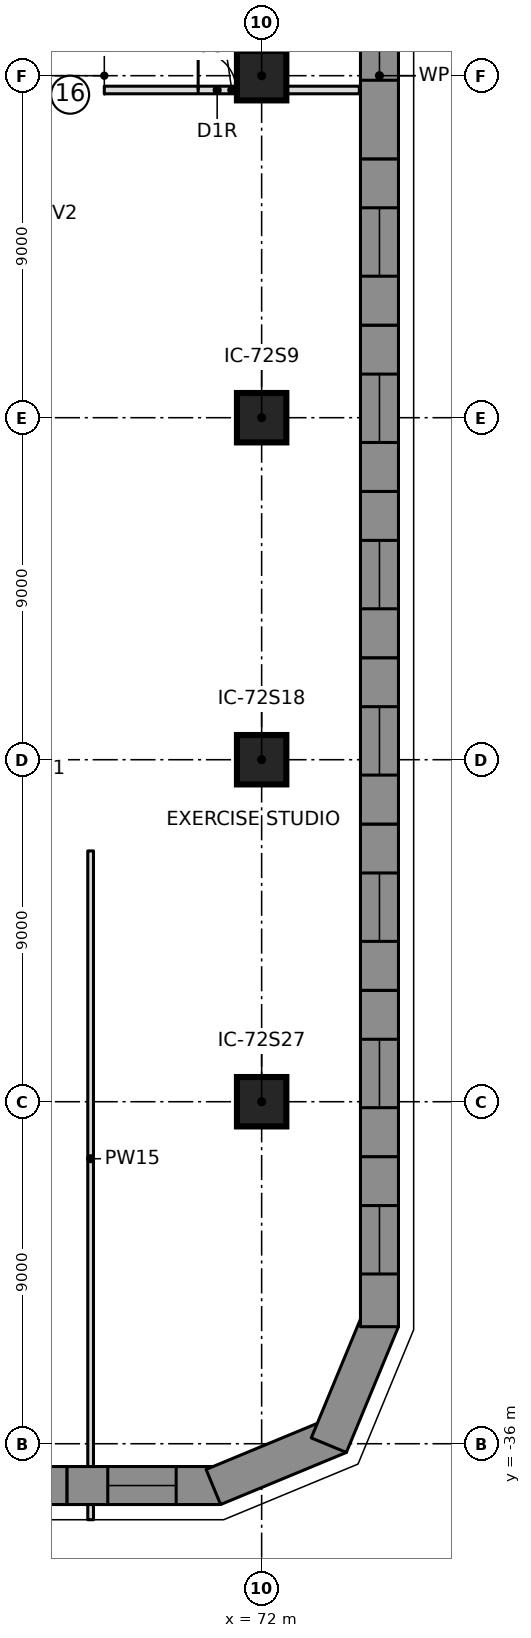
"""IFC4 building model, lengths in metres.
Left out: names, types, materials, properties, quantities, classifications, styles, units other than length and angle.
Written with IfcOpenShell. Run it as: python <this file> out.ifc"""

import sys

from ifc_helpers import new_model, si_unit, direction, frame, frame_2d, origin, origin_2d, place, context, subcontext, project, spatial, polyline, rectangle, outline, extrude, element, fill, save


model = new_model("IFC4")
c1 = context("Model", 3, precision=1e-05, world=origin(), true_north=direction((0.0, 1.0)))
c2 = subcontext(c1, "Body", "Model", "MODEL_VIEW")
j1 = project(units=[si_unit("LENGTHUNIT", "METRE"), si_unit("PLANEANGLEUNIT", "RADIAN")], contexts=[c1])
p1 = place(None, origin())
s1 = spatial("IfcSite", under=j1, at=p1, CompositionType="ELEMENT")
p2 = place(p1, origin())
s2 = spatial("IfcBuilding", under=s1, at=p2, CompositionType="ELEMENT")
p3 = place(p2, frame((0.0, 0.0, 19.0)))
s3 = spatial("IfcBuildingStorey", under=s2, at=p3, CompositionType="ELEMENT", Elevation=19.0)
for number, where, z_axis, x_axis in (
    (1, (72.0, -27.0, 0.0), (0.0, 0.0, 1.0), (1.0, 0.0, 0.0)),
    (2, (72.0, -18.0, 0.0), (0.0, 0.0, 1.0), (1.0, 0.0, 0.0)),
    (3, (72.0, -9.0, 0.0), (0.0, 0.0, 1.0), (1.0, 0.0, 0.0)),
    (4, (72.0, 0.0, 0.0), (0.0, 0.0, 1.0), (1.0, 0.0, 0.0)),
):
    element("IfcColumn", number, at=place(p3, frame(where, z_axis=z_axis, x_axis=x_axis)), inside=s3, PredefinedType="COLUMN", context=c2, shape_type="SweptSolid", body=[
        extrude(rectangle(XDim=1.3, YDim=1.3, at=origin_2d()), origin(), (0.0, 0.0, 1.0), 5.0),
    ])
p4 = place(p3, frame((62.94, -37.1, 0.0), z_axis=(0.0, 0.0, 1.0), x_axis=(1.0, 0.0, 0.0)))
e5 = element("IfcWall", 5, at=p4, inside=s3, PredefinedType="NOTDEFINED", context=c2, shape_type="SweptSolid", body=[
    extrude(outline(polyline([(0.0, -0.5), (3.94, -0.5), (3.94, 0.5), (0.0, 0.5), (0.0, -0.5)])), origin(), (0.0, 0.0, 1.0), 4.7),
])
p5 = place(p4, frame((1.07, 0.0, 0.9)))
e6 = element("IfcOpeningElement", 6, at=p5, cuts=e5, PredefinedType="OPENING", context=c2, shape_type="SweptSolid", body=[
    extrude(rectangle(XDim=1.8, YDim=2.4, at=frame_2d((0.9, 1.2))), frame((0.0, 0.51, 0.0), z_axis=(0.0, -1.0, 0.0), x_axis=(1.0, 0.0, 0.0)), (0.0, 0.0, 1.0), 1.02),
])
p6 = place(p3, frame((66.881, -37.1, 0.0), z_axis=(0.0, 0.0, 1.0), x_axis=(1.0, 0.0, 0.0)))
e7 = element("IfcWall", 7, at=p6, inside=s3, PredefinedType="NOTDEFINED", context=c2, shape_type="SweptSolid", body=[
    extrude(outline(polyline([(0.0, -0.5), (4.04, -0.5), (3.841, 0.5), (0.0, 0.5), (0.0, -0.5)])), origin(), (0.0, 0.0, 1.0), 4.7),
])
p7 = place(p6, frame((1.07, 0.0, 0.9)))
e8 = element("IfcOpeningElement", 8, at=p7, cuts=e7, PredefinedType="OPENING", context=c2, shape_type="SweptSolid", body=[
    extrude(rectangle(XDim=1.8, YDim=2.4, at=frame_2d((0.9, 1.2))), frame((0.0, 0.51, 0.0), z_axis=(0.0, -1.0, 0.0), x_axis=(1.0, 0.0, 0.0)), (0.0, 0.0, 1.0), 1.02),
])
p8 = place(p3, frame((70.821, -37.1, 0.0), z_axis=(0.0, 0.0, 1.0), x_axis=(0.923862365102, 0.382724875529, 0.0)))
e9 = element("IfcWall", 9, at=p8, inside=s3, PredefinedType="NOTDEFINED", context=c2, shape_type="SweptSolid", body=[
    extrude(outline(polyline([(-0.1, -0.5), (3.482, -0.5), (3.068, 0.5), (0.1, 0.5), (-0.1, -0.5)])), origin(), (0.0, 0.0, 1.0), 4.7),
])
p9 = place(p3, frame((73.847, -35.847, 0.0), z_axis=(0.0, 0.0, 1.0), x_axis=(0.382724875529, 0.923862365102, 0.0)))
e10 = element("IfcWall", 10, at=p9, inside=s3, PredefinedType="NOTDEFINED", context=c2, shape_type="SweptSolid", body=[
    extrude(outline(polyline([(-0.207, -0.5), (3.375, -0.5), (3.175, 0.5), (0.207, 0.5), (-0.207, -0.5)])), origin(), (0.0, 0.0, 1.0), 4.7),
])
p10 = place(p3, frame((75.1, -32.821, 0.0), z_axis=(0.0, 0.0, 1.0), x_axis=(0.0, 1.0, 0.0)))
e11 = element("IfcWall", 11, at=p10, inside=s3, PredefinedType="NOTDEFINED", context=c2, shape_type="SweptSolid", body=[
    extrude(outline(polyline([(-0.1, -0.5), (4.376, -0.5), (4.376, 0.5), (0.1, 0.5), (-0.1, -0.5)])), origin(), (0.0, 0.0, 1.0), 4.7),
])
p11 = place(p10, frame((1.288, 0.0, 0.9)))
e12 = element("IfcOpeningElement", 12, at=p11, cuts=e11, PredefinedType="OPENING", context=c2, shape_type="SweptSolid", body=[
    extrude(rectangle(XDim=1.8, YDim=2.4, at=frame_2d((0.9, 1.2))), frame((0.0, 0.51, 0.0), z_axis=(0.0, -1.0, 0.0), x_axis=(1.0, 0.0, 0.0)), (0.0, 0.0, 1.0), 1.02),
])
p12 = place(p3, frame((75.1, -28.445, 0.0), z_axis=(0.0, 0.0, 1.0), x_axis=(0.0, 1.0, 0.0)))
e13 = element("IfcWall", 13, at=p12, inside=s3, PredefinedType="NOTDEFINED", context=c2, shape_type="SweptSolid", body=[
    extrude(outline(polyline([(0.0, -0.5), (4.376, -0.5), (4.376, 0.5), (0.0, 0.5), (0.0, -0.5)])), origin(), (0.0, 0.0, 1.0), 4.7),
])
p13 = place(p12, frame((1.288, 0.0, 0.9)))
e14 = element("IfcOpeningElement", 14, at=p13, cuts=e13, PredefinedType="OPENING", context=c2, shape_type="SweptSolid", body=[
    extrude(rectangle(XDim=1.8, YDim=2.4, at=frame_2d((0.9, 1.2))), frame((0.0, 0.51, 0.0), z_axis=(0.0, -1.0, 0.0), x_axis=(1.0, 0.0, 0.0)), (0.0, 0.0, 1.0), 1.02),
])
p14 = place(p3, frame((75.1, -24.069, 0.0), z_axis=(0.0, 0.0, 1.0), x_axis=(0.0, 1.0, 0.0)))
e15 = element("IfcWall", 15, at=p14, inside=s3, PredefinedType="NOTDEFINED", context=c2, shape_type="SweptSolid", body=[
    extrude(outline(polyline([(0.0, -0.5), (4.376, -0.5), (4.376, 0.5), (0.0, 0.5), (0.0, -0.5)])), origin(), (0.0, 0.0, 1.0), 4.7),
])
p15 = place(p14, frame((1.288, 0.0, 0.9)))
e16 = element("IfcOpeningElement", 16, at=p15, cuts=e15, PredefinedType="OPENING", context=c2, shape_type="SweptSolid", body=[
    extrude(rectangle(XDim=1.8, YDim=2.4, at=frame_2d((0.9, 1.2))), frame((0.0, 0.51, 0.0), z_axis=(0.0, -1.0, 0.0), x_axis=(1.0, 0.0, 0.0)), (0.0, 0.0, 1.0), 1.02),
])
p16 = place(p3, frame((75.1, -19.693, 0.0), z_axis=(0.0, 0.0, 1.0), x_axis=(0.0, 1.0, 0.0)))
e17 = element("IfcWall", 17, at=p16, inside=s3, PredefinedType="NOTDEFINED", context=c2, shape_type="SweptSolid", body=[
    extrude(outline(polyline([(0.0, -0.5), (4.376, -0.5), (4.376, 0.5), (0.0, 0.5), (0.0, -0.5)])), origin(), (0.0, 0.0, 1.0), 4.7),
])
p17 = place(p16, frame((1.288, 0.0, 0.9)))
e18 = element("IfcOpeningElement", 18, at=p17, cuts=e17, PredefinedType="OPENING", context=c2, shape_type="SweptSolid", body=[
    extrude(rectangle(XDim=1.8, YDim=2.4, at=frame_2d((0.9, 1.2))), frame((0.0, 0.51, 0.0), z_axis=(0.0, -1.0, 0.0), x_axis=(1.0, 0.0, 0.0)), (0.0, 0.0, 1.0), 1.02),
])
p18 = place(p3, frame((75.1, -15.316, 0.0), z_axis=(0.0, 0.0, 1.0), x_axis=(0.0, 1.0, 0.0)))
e19 = element("IfcWall", 19, at=p18, inside=s3, PredefinedType="NOTDEFINED", context=c2, shape_type="SweptSolid", body=[
    extrude(outline(polyline([(0.0, -0.5), (4.376, -0.5), (4.376, 0.5), (0.0, 0.5), (0.0, -0.5)])), origin(), (0.0, 0.0, 1.0), 4.7),
])
p19 = place(p18, frame((1.288, 0.0, 0.9)))
e20 = element("IfcOpeningElement", 20, at=p19, cuts=e19, PredefinedType="OPENING", context=c2, shape_type="SweptSolid", body=[
    extrude(rectangle(XDim=1.8, YDim=2.4, at=frame_2d((0.9, 1.2))), frame((0.0, 0.51, 0.0), z_axis=(0.0, -1.0, 0.0), x_axis=(1.0, 0.0, 0.0)), (0.0, 0.0, 1.0), 1.02),
])
p20 = place(p3, frame((75.1, -10.94, 0.0), z_axis=(0.0, 0.0, 1.0), x_axis=(0.0, 1.0, 0.0)))
e21 = element("IfcWall", 21, at=p20, inside=s3, PredefinedType="NOTDEFINED", context=c2, shape_type="SweptSolid", body=[
    extrude(outline(polyline([(0.0, -0.5), (4.376, -0.5), (4.376, 0.5), (0.0, 0.5), (0.0, -0.5)])), origin(), (0.0, 0.0, 1.0), 4.7),
])
p21 = place(p20, frame((1.288, 0.0, 0.9)))
e22 = element("IfcOpeningElement", 22, at=p21, cuts=e21, PredefinedType="OPENING", context=c2, shape_type="SweptSolid", body=[
    extrude(rectangle(XDim=1.8, YDim=2.4, at=frame_2d((0.9, 1.2))), frame((0.0, 0.51, 0.0), z_axis=(0.0, -1.0, 0.0), x_axis=(1.0, 0.0, 0.0)), (0.0, 0.0, 1.0), 1.02),
])
p22 = place(p3, frame((75.1, -6.564, 0.0), z_axis=(0.0, 0.0, 1.0), x_axis=(0.0, 1.0, 0.0)))
e23 = element("IfcWall", 23, at=p22, inside=s3, PredefinedType="NOTDEFINED", context=c2, shape_type="SweptSolid", body=[
    extrude(outline(polyline([(0.0, -0.5), (4.376, -0.5), (4.376, 0.5), (0.0, 0.5), (0.0, -0.5)])), origin(), (0.0, 0.0, 1.0), 4.7),
])
p23 = place(p22, frame((1.288, 0.0, 0.9)))
e24 = element("IfcOpeningElement", 24, at=p23, cuts=e23, PredefinedType="OPENING", context=c2, shape_type="SweptSolid", body=[
    extrude(rectangle(XDim=1.8, YDim=2.4, at=frame_2d((0.9, 1.2))), frame((0.0, 0.51, 0.0), z_axis=(0.0, -1.0, 0.0), x_axis=(1.0, 0.0, 0.0)), (0.0, 0.0, 1.0), 1.02),
])
p24 = place(p3, frame((75.1, -2.188, 0.0), z_axis=(0.0, 0.0, 1.0), x_axis=(0.0, 1.0, 0.0)))
e25 = element("IfcWall", 25, at=p24, inside=s3, PredefinedType="NOTDEFINED", context=c2, shape_type="SweptSolid", body=[
    extrude(outline(polyline([(0.0, -0.5), (4.376, -0.5), (4.376, 0.5), (0.0, 0.5), (0.0, -0.5)])), origin(), (0.0, 0.0, 1.0), 4.7),
])
p25 = place(p24, frame((2.068, 0.0, 0.9)))
e26 = element("IfcOpeningElement", 26, at=p25, cuts=e25, PredefinedType="OPENING", context=c2, shape_type="SweptSolid", body=[
    extrude(rectangle(XDim=1.8, YDim=2.4, at=frame_2d((0.9, 1.2))), frame((0.0, 0.51, 0.0), z_axis=(0.0, -1.0, 0.0), x_axis=(1.0, 0.0, 0.0)), (0.0, 0.0, 1.0), 1.02),
])
p26 = place(p3, frame((67.5, -38.0, 0.0), z_axis=(0.0, 0.0, 1.0), x_axis=(0.0, 1.0, 0.0)))
e27 = element("IfcWall", 27, at=p26, inside=s3, PredefinedType="PARTITIONING", context=c2, shape_type="SweptSolid", body=[
    extrude(rectangle(XDim=0.4, YDim=0.15, at=frame_2d((0.2, 0.0))), origin(), (0.0, 0.0, 1.0), 4.65),
])
p27 = place(p3, frame((67.5, -36.6, 0.0), z_axis=(0.0, 0.0, 1.0), x_axis=(0.0, 1.0, 0.0)))
e28 = element("IfcWall", 28, at=p27, inside=s3, PredefinedType="PARTITIONING", context=c2, shape_type="SweptSolid", body=[
    extrude(rectangle(XDim=16.2, YDim=0.15, at=frame_2d((8.1, 0.0))), origin(), (0.0, 0.0, 1.0), 4.65),
])
p28 = place(p3, frame((67.859, -0.376, 0.0), z_axis=(0.0, 0.0, 1.0), x_axis=(1.0, 0.0, 0.0)))
e29 = element("IfcWall", 29, at=p28, inside=s3, PredefinedType="PARTITIONING", context=c2, shape_type="SweptSolid", body=[
    extrude(rectangle(XDim=6.711, YDim=0.2, at=frame_2d((3.355, 0.0))), origin(), (0.0, 0.0, 1.0), 4.65),
])
p29 = place(p28, frame((2.47, 0.0, 0.0)))
e30 = element("IfcOpeningElement", 30, at=p29, cuts=e29, PredefinedType="OPENING", context=c2, shape_type="SweptSolid", body=[
    extrude(rectangle(XDim=1.0, YDim=2.1, at=frame_2d((0.5, 1.05))), frame((0.0, 0.11, 0.0), z_axis=(0.0, -1.0, 0.0), x_axis=(1.0, 0.0, 0.0)), (0.0, 0.0, 1.0), 0.22),
])
p30 = place(p7, origin())
e31 = element("IfcWindow", 31, at=p30, inside=s3, PartitioningType="SINGLE_PANEL", PredefinedType="WINDOW", context=c2, shape_type="SweptSolid", body=[
    extrude(rectangle(XDim=1.8, YDim=2.4, at=frame_2d((0.9, 1.2))), frame((0.0, 0.5, 0.0), z_axis=(0.0, -1.0, 0.0), x_axis=(1.0, 0.0, 0.0)), (0.0, 0.0, 1.0), 0.06),
])
fill(e8, e31)
p31 = place(p11, origin())
e32 = element("IfcWindow", 32, at=p31, inside=s3, PartitioningType="SINGLE_PANEL", PredefinedType="WINDOW", context=c2, shape_type="SweptSolid", body=[
    extrude(rectangle(XDim=1.8, YDim=2.4, at=frame_2d((0.9, 1.2))), frame((0.0, 0.5, 0.0), z_axis=(0.0, -1.0, 0.0), x_axis=(1.0, 0.0, 0.0)), (0.0, 0.0, 1.0), 0.06),
])
fill(e12, e32)
p32 = place(p13, origin())
e33 = element("IfcWindow", 33, at=p32, inside=s3, PartitioningType="SINGLE_PANEL", PredefinedType="WINDOW", context=c2, shape_type="SweptSolid", body=[
    extrude(rectangle(XDim=1.8, YDim=2.4, at=frame_2d((0.9, 1.2))), frame((0.0, 0.5, 0.0), z_axis=(0.0, -1.0, 0.0), x_axis=(1.0, 0.0, 0.0)), (0.0, 0.0, 1.0), 0.06),
])
fill(e14, e33)
p33 = place(p15, origin())
e34 = element("IfcWindow", 34, at=p33, inside=s3, PartitioningType="SINGLE_PANEL", PredefinedType="WINDOW", context=c2, shape_type="SweptSolid", body=[
    extrude(rectangle(XDim=1.8, YDim=2.4, at=frame_2d((0.9, 1.2))), frame((0.0, 0.5, 0.0), z_axis=(0.0, -1.0, 0.0), x_axis=(1.0, 0.0, 0.0)), (0.0, 0.0, 1.0), 0.06),
])
fill(e16, e34)
p34 = place(p17, origin())
e35 = element("IfcWindow", 35, at=p34, inside=s3, PartitioningType="SINGLE_PANEL", PredefinedType="WINDOW", context=c2, shape_type="SweptSolid", body=[
    extrude(rectangle(XDim=1.8, YDim=2.4, at=frame_2d((0.9, 1.2))), frame((0.0, 0.5, 0.0), z_axis=(0.0, -1.0, 0.0), x_axis=(1.0, 0.0, 0.0)), (0.0, 0.0, 1.0), 0.06),
])
fill(e18, e35)
p35 = place(p19, origin())
e36 = element("IfcWindow", 36, at=p35, inside=s3, PartitioningType="SINGLE_PANEL", PredefinedType="WINDOW", context=c2, shape_type="SweptSolid", body=[
    extrude(rectangle(XDim=1.8, YDim=2.4, at=frame_2d((0.9, 1.2))), frame((0.0, 0.5, 0.0), z_axis=(0.0, -1.0, 0.0), x_axis=(1.0, 0.0, 0.0)), (0.0, 0.0, 1.0), 0.06),
])
fill(e20, e36)
p36 = place(p21, origin())
e37 = element("IfcWindow", 37, at=p36, inside=s3, PartitioningType="SINGLE_PANEL", PredefinedType="WINDOW", context=c2, shape_type="SweptSolid", body=[
    extrude(rectangle(XDim=1.8, YDim=2.4, at=frame_2d((0.9, 1.2))), frame((0.0, 0.5, 0.0), z_axis=(0.0, -1.0, 0.0), x_axis=(1.0, 0.0, 0.0)), (0.0, 0.0, 1.0), 0.06),
])
fill(e22, e37)
p37 = place(p23, origin())
e38 = element("IfcWindow", 38, at=p37, inside=s3, PartitioningType="SINGLE_PANEL", PredefinedType="WINDOW", context=c2, shape_type="SweptSolid", body=[
    extrude(rectangle(XDim=1.8, YDim=2.4, at=frame_2d((0.9, 1.2))), frame((0.0, 0.5, 0.0), z_axis=(0.0, -1.0, 0.0), x_axis=(1.0, 0.0, 0.0)), (0.0, 0.0, 1.0), 0.06),
])
fill(e24, e38)
p38 = place(p25, origin())
e39 = element("IfcWindow", 39, at=p38, inside=s3, PartitioningType="SINGLE_PANEL", PredefinedType="WINDOW", context=c2, shape_type="SweptSolid", body=[
    extrude(rectangle(XDim=1.8, YDim=2.4, at=frame_2d((0.9, 1.2))), frame((0.0, 0.5, 0.0), z_axis=(0.0, -1.0, 0.0), x_axis=(1.0, 0.0, 0.0)), (0.0, 0.0, 1.0), 0.06),
])
fill(e26, e39)
p39 = place(p29, origin())
e40 = element("IfcDoor", 40, at=p39, inside=s3, OperationType="SINGLE_SWING_RIGHT", PredefinedType="DOOR", context=c2, shape_type="SweptSolid", body=[
    extrude(rectangle(XDim=1.0, YDim=2.1, at=frame_2d((0.5, 1.05))), frame((0.0, 0.025, 0.0), z_axis=(0.0, -1.0, 0.0), x_axis=(1.0, 0.0, 0.0)), (0.0, 0.0, 1.0), 0.05),
])
fill(e30, e40)
save(model, sys.argv[1])
